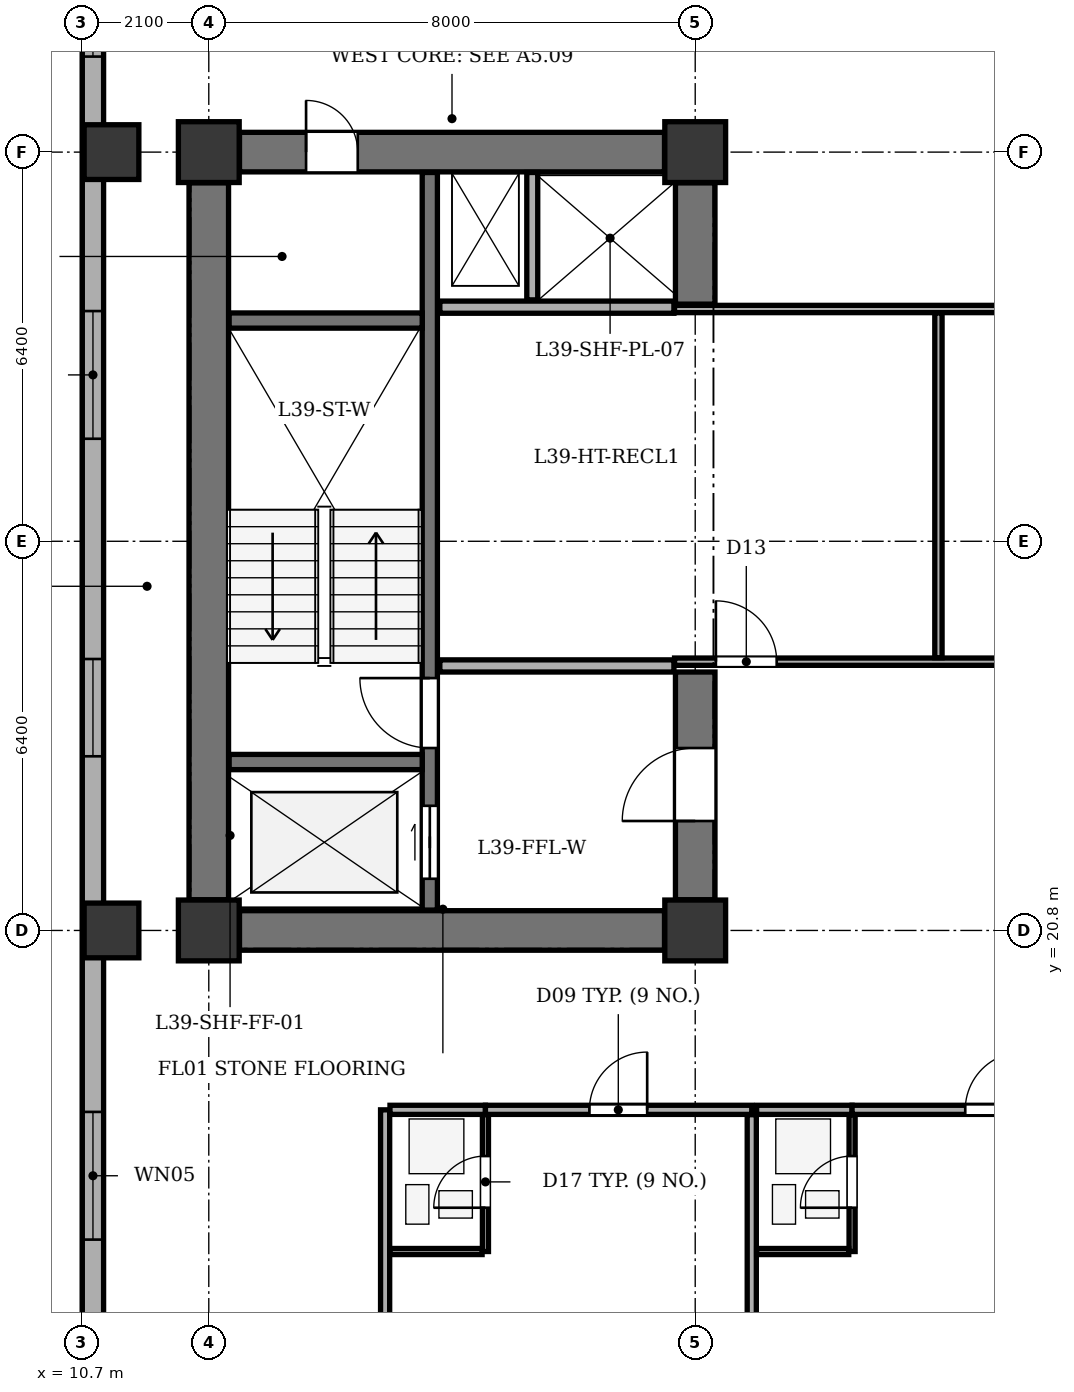
"""IFC4 building model, lengths in metres.
Left out: names, types, materials, properties, quantities, classifications, styles, units other than length and angle.
Written with IfcOpenShell. Run it as: python <this file> out.ifc"""

import sys

from ifc_helpers import new_model, si_unit, direction, frame, frame_2d, origin, origin_2d, place, context, subcontext, project, spatial, rectangle, extrude, element, fill, save


model = new_model("IFC4")
c1 = context("Model", 3, precision=1e-05, world=origin(), true_north=direction((0.0, 1.0)))
c2 = subcontext(c1, "Body", "Model", "MODEL_VIEW")
j1 = project(units=[si_unit("LENGTHUNIT", "METRE"), si_unit("PLANEANGLEUNIT", "RADIAN")], contexts=[c1])
p1 = place(None, origin())
s1 = spatial("IfcSite", under=j1, at=p1, CompositionType="ELEMENT")
p2 = place(p1, origin())
s2 = spatial("IfcBuilding", under=s1, at=p2, CompositionType="ELEMENT")
p3 = place(p2, frame((0.0, 0.0, 155.3)))
s3 = spatial("IfcBuildingStorey", under=s2, at=p3, CompositionType="ELEMENT", Elevation=155.3)
for number, where, z_axis, x_axis in (
    (1, (12.8, 20.8, 0.0), (0.0, 0.0, 1.0), (1.0, 0.0, 0.0)),
    (2, (20.8, 20.8, 0.0), (0.0, 0.0, 1.0), (1.0, 0.0, 0.0)),
    (3, (12.8, 33.6, 0.0), (0.0, 0.0, 1.0), (1.0, 0.0, 0.0)),
    (4, (20.8, 33.6, 0.0), (0.0, 0.0, 1.0), (1.0, 0.0, 0.0)),
):
    element("IfcColumn", number, at=place(p3, frame(where, z_axis=z_axis, x_axis=x_axis)), inside=s3, PredefinedType="COLUMN", context=c2, shape_type="SweptSolid", body=[
        extrude(rectangle(XDim=1.0, YDim=1.0, at=origin_2d()), origin(), (0.0, 0.0, 1.0), 3.5),
    ])
for number, where, z_axis, x_axis in (
    (5, (11.2, 20.8, 0.0), (0.0, 0.0, 1.0), (1.0, 0.0, 0.0)),
    (6, (11.2, 33.6, 0.0), (0.0, 0.0, 1.0), (1.0, 0.0, 0.0)),
):
    element("IfcColumn", number, at=place(p3, frame(where, z_axis=z_axis, x_axis=x_axis)), inside=s3, PredefinedType="COLUMN", context=c2, shape_type="SweptSolid", body=[
        extrude(rectangle(XDim=0.9, YDim=0.9, at=origin_2d()), origin(), (0.0, 0.0, 1.0), 3.5),
    ])
p4 = place(p3, frame((10.895, 6.5, 0.0), z_axis=(0.0, 0.0, 1.0), x_axis=(0.0, 1.0, 0.0)))
e7 = element("IfcWall", 7, at=p4, inside=s3, PredefinedType="STANDARD", context=c2, shape_type="SweptSolid", body=[
    extrude(rectangle(XDim=35.0, YDim=0.35, at=frame_2d((17.5, 0.0))), origin(), (0.0, 0.0, 1.0), 2.785),
])
p5 = place(p4, frame((3.31, 0.0, 0.75)))
e8 = element("IfcOpeningElement", 8, at=p5, cuts=e7, PredefinedType="OPENING", context=c2, shape_type="SweptSolid", body=[
    extrude(rectangle(XDim=1.6, YDim=1.75, at=frame_2d((0.8, 0.875))), frame((0.0, 0.185, 0.0), z_axis=(0.0, -1.0, 0.0), x_axis=(1.0, 0.0, 0.0)), (0.0, 0.0, 1.0), 0.37),
])
p6 = place(p4, frame((9.216, 0.0, 0.75)))
e9 = element("IfcOpeningElement", 9, at=p6, cuts=e7, PredefinedType="OPENING", context=c2, shape_type="SweptSolid", body=[
    extrude(rectangle(XDim=2.1, YDim=1.75, at=frame_2d((1.05, 0.875))), frame((0.0, 0.185, 0.0), z_axis=(0.0, -1.0, 0.0), x_axis=(1.0, 0.0, 0.0)), (0.0, 0.0, 1.0), 0.37),
])
p7 = place(p4, frame((17.164, 0.0, 0.75)))
e10 = element("IfcOpeningElement", 10, at=p7, cuts=e7, PredefinedType="OPENING", context=c2, shape_type="SweptSolid", body=[
    extrude(rectangle(XDim=1.6, YDim=1.75, at=frame_2d((0.8, 0.875))), frame((0.0, 0.185, 0.0), z_axis=(0.0, -1.0, 0.0), x_axis=(1.0, 0.0, 0.0)), (0.0, 0.0, 1.0), 0.37),
])
p8 = place(p4, frame((22.386, 0.0, 0.75)))
e11 = element("IfcOpeningElement", 11, at=p8, cuts=e7, PredefinedType="OPENING", context=c2, shape_type="SweptSolid", body=[
    extrude(rectangle(XDim=2.1, YDim=1.75, at=frame_2d((1.05, 0.875))), frame((0.0, 0.185, 0.0), z_axis=(0.0, -1.0, 0.0), x_axis=(1.0, 0.0, 0.0)), (0.0, 0.0, 1.0), 0.37),
])
p9 = place(p4, frame((28.671, 0.0, 0.75)))
e12 = element("IfcOpeningElement", 12, at=p9, cuts=e7, PredefinedType="OPENING", context=c2, shape_type="SweptSolid", body=[
    extrude(rectangle(XDim=1.6, YDim=1.75, at=frame_2d((0.8, 0.875))), frame((0.0, 0.185, 0.0), z_axis=(0.0, -1.0, 0.0), x_axis=(1.0, 0.0, 0.0)), (0.0, 0.0, 1.0), 0.37),
])
p10 = place(p4, frame((31.755, 0.0, 0.75)))
e13 = element("IfcOpeningElement", 13, at=p10, cuts=e7, PredefinedType="OPENING", context=c2, shape_type="SweptSolid", body=[
    extrude(rectangle(XDim=1.6, YDim=1.75, at=frame_2d((0.8, 0.875))), frame((0.0, 0.185, 0.0), z_axis=(0.0, -1.0, 0.0), x_axis=(1.0, 0.0, 0.0)), (0.0, 0.0, 1.0), 0.37),
])
p11 = place(p3, frame((12.8, 21.305, 0.0), z_axis=(0.0, 0.0, 1.0), x_axis=(0.0, 1.0, 0.0)))
e14 = element("IfcWall", 14, at=p11, inside=s3, PredefinedType="SHEAR", context=c2, shape_type="SweptSolid", body=[
    extrude(rectangle(XDim=11.79, YDim=0.65, at=frame_2d((5.895, 0.0))), origin(), (0.0, 0.0, 1.0), 3.2),
])
p12 = place(p3, frame((13.305, 20.8, 0.0), z_axis=(0.0, 0.0, 1.0), x_axis=(1.0, 0.0, 0.0)))
e15 = element("IfcWall", 15, at=p12, inside=s3, PredefinedType="SHEAR", context=c2, shape_type="SweptSolid", body=[
    extrude(rectangle(XDim=6.99, YDim=0.65, at=frame_2d((3.495, 0.0))), origin(), (0.0, 0.0, 1.0), 3.2),
])
p13 = place(p3, frame((13.305, 33.6, 0.0), z_axis=(0.0, 0.0, 1.0), x_axis=(1.0, 0.0, 0.0)))
e16 = element("IfcWall", 16, at=p13, inside=s3, PredefinedType="SHEAR", context=c2, shape_type="SweptSolid", body=[
    extrude(rectangle(XDim=6.99, YDim=0.65, at=frame_2d((3.495, 0.0))), origin(), (0.0, 0.0, 1.0), 3.2),
])
p14 = place(p13, frame((1.095, 0.0, 0.0)))
e17 = element("IfcOpeningElement", 17, at=p14, cuts=e16, PredefinedType="OPENING", context=c2, shape_type="SweptSolid", body=[
    extrude(rectangle(XDim=0.85, YDim=2.02, at=frame_2d((0.425, 1.01))), frame((0.0, 0.335, 0.0), z_axis=(0.0, -1.0, 0.0), x_axis=(1.0, 0.0, 0.0)), (0.0, 0.0, 1.0), 0.67),
])
p15 = place(p3, frame((20.8, 21.305, 0.0), z_axis=(0.0, 0.0, 1.0), x_axis=(0.0, 1.0, 0.0)))
e18 = element("IfcWall", 18, at=p15, inside=s3, PredefinedType="SHEAR", context=c2, shape_type="SweptSolid", body=[
    extrude(rectangle(XDim=3.745, YDim=0.65, at=frame_2d((1.873, 0.0))), origin(), (0.0, 0.0, 1.0), 3.2),
])
p16 = place(p15, frame((1.295, 0.0, 0.0)))
e19 = element("IfcOpeningElement", 19, at=p16, cuts=e18, PredefinedType="OPENING", context=c2, shape_type="SweptSolid", body=[
    extrude(rectangle(XDim=1.2, YDim=2.15, at=frame_2d((0.6, 1.075))), frame((0.0, 0.335, 0.0), z_axis=(0.0, -1.0, 0.0), x_axis=(1.0, 0.0, 0.0)), (0.0, 0.0, 1.0), 0.67),
])
p17 = place(p3, frame((20.8, 31.1, 0.0), z_axis=(0.0, 0.0, 1.0), x_axis=(0.0, 1.0, 0.0)))
e20 = element("IfcWall", 20, at=p17, inside=s3, PredefinedType="SHEAR", context=c2, shape_type="SweptSolid", body=[
    extrude(rectangle(XDim=1.995, YDim=0.65, at=frame_2d((0.998, 0.0))), origin(), (0.0, 0.0, 1.0), 3.2),
])
p18 = place(p3, frame((16.435, 21.135, 0.0), z_axis=(0.0, 0.0, 1.0), x_axis=(0.0, 1.0, 0.0)))
e21 = element("IfcWall", 21, at=p18, inside=s3, PredefinedType="SHEAR", context=c2, shape_type="SweptSolid", body=[
    extrude(rectangle(XDim=12.13, YDim=0.25, at=frame_2d((6.065, 0.0))), origin(), (0.0, 0.0, 1.0), 3.2),
])
p19 = place(p18, frame((0.515, 0.0, 0.0)))
e22 = element("IfcOpeningElement", 22, at=p19, cuts=e21, PredefinedType="OPENING", context=c2, shape_type="SweptSolid", body=[
    extrude(rectangle(XDim=1.2, YDim=2.15, at=frame_2d((0.6, 1.075))), frame((0.0, 0.135, 0.0), z_axis=(0.0, -1.0, 0.0), x_axis=(1.0, 0.0, 0.0)), (0.0, 0.0, 1.0), 0.27),
])
p20 = place(p18, frame((2.665, 0.0, 0.0)))
e23 = element("IfcOpeningElement", 23, at=p20, cuts=e21, PredefinedType="OPENING", context=c2, shape_type="SweptSolid", body=[
    extrude(rectangle(XDim=1.15, YDim=2.15, at=frame_2d((0.575, 1.075))), frame((0.0, 0.135, 0.0), z_axis=(0.0, -1.0, 0.0), x_axis=(1.0, 0.0, 0.0)), (0.0, 0.0, 1.0), 0.27),
])
for number, where, z_axis, x_axis in (
    (24, (13.135, 23.57, 0.0), (0.0, 0.0, 1.0), (1.0, 0.0, 0.0)),
    (25, (13.135, 30.83, 0.0), (0.0, 0.0, 1.0), (1.0, 0.0, 0.0)),
):
    element("IfcWall", number, at=place(p3, frame(where, z_axis=z_axis, x_axis=x_axis)), inside=s3, PredefinedType="SHEAR", context=c2, shape_type="SweptSolid", body=[
        extrude(rectangle(XDim=3.175, YDim=0.25, at=frame_2d((1.587, 0.0))), origin(), (0.0, 0.0, 1.0), 3.2),
    ])
for number, where, z_axis, x_axis in (
    (26, (16.6, 25.15, 0.0), (0.0, 0.0, 1.0), (1.0, 0.0, 0.0)),
    (27, (16.6, 31.05, 0.0), (0.0, 0.0, 1.0), (1.0, 0.0, 0.0)),
):
    element("IfcWall", number, at=place(p3, frame(where, z_axis=z_axis, x_axis=x_axis)), inside=s3, PredefinedType="SOLIDWALL", context=c2, shape_type="SweptSolid", body=[
        extrude(rectangle(XDim=3.85, YDim=0.2, at=frame_2d((1.925, 0.0))), origin(), (0.0, 0.0, 1.0), 3.2),
    ])
p21 = place(p3, frame((18.12, 31.17, 0.0), z_axis=(0.0, 0.0, 1.0), x_axis=(0.0, 1.0, 0.0)))
e28 = element("IfcWall", 28, at=p21, inside=s3, PredefinedType="PARTITIONING", context=c2, shape_type="SweptSolid", body=[
    extrude(rectangle(XDim=2.095, YDim=0.18, at=frame_2d((1.047, 0.0))), origin(), (0.0, 0.0, 1.0), 3.2),
])
p22 = place(p3, frame((20.46, 25.22, 0.0), z_axis=(0.0, 0.0, 1.0), x_axis=(1.0, 0.0, 0.0)))
e29 = element("IfcWall", 29, at=p22, inside=s3, PredefinedType="PARTITIONING", context=c2, shape_type="SweptSolid", body=[
    extrude(rectangle(XDim=11.94, YDim=0.12, at=frame_2d((5.97, 0.0))), origin(), (0.0, 0.0, 1.0), 3.2),
])
p23 = place(p22, frame((0.68, 0.0, 0.0)))
e30 = element("IfcOpeningElement", 30, at=p23, cuts=e29, PredefinedType="OPENING", context=c2, shape_type="SweptSolid", body=[
    extrude(rectangle(XDim=1.0, YDim=2.1, at=frame_2d((0.5, 1.05))), frame((0.0, 0.07, 0.0), z_axis=(0.0, -1.0, 0.0), x_axis=(1.0, 0.0, 0.0)), (0.0, 0.0, 1.0), 0.14),
])
p24 = place(p3, frame((20.46, 31.02, 0.0), z_axis=(0.0, 0.0, 1.0), x_axis=(1.0, 0.0, 0.0)))
e31 = element("IfcWall", 31, at=p24, inside=s3, PredefinedType="PARTITIONING", context=c2, shape_type="SweptSolid", body=[
    extrude(rectangle(XDim=11.94, YDim=0.12, at=frame_2d((5.97, 0.0))), origin(), (0.0, 0.0, 1.0), 3.2),
])
p25 = place(p3, frame((24.8, 25.285, 0.0), z_axis=(0.0, 0.0, 1.0), x_axis=(0.0, 1.0, 0.0)))
e32 = element("IfcWall", 32, at=p25, inside=s3, PredefinedType="PARTITIONING", context=c2, shape_type="SweptSolid", body=[
    extrude(rectangle(XDim=5.67, YDim=0.12, at=frame_2d((2.835, 0.0))), origin(), (0.0, 0.0, 1.0), 3.2),
])
p26 = place(p3, frame((15.7, 1.875, 0.0), z_axis=(0.0, 0.0, 1.0), x_axis=(0.0, 1.0, 0.0)))
e33 = element("IfcWall", 33, at=p26, inside=s3, PredefinedType="PARTITIONING", context=c2, shape_type="SweptSolid", body=[
    extrude(rectangle(XDim=15.975, YDim=0.15, at=frame_2d((7.988, 0.0))), origin(), (0.0, 0.0, 1.0), 3.2),
])
p27 = place(p3, frame((15.78, 17.85, 0.0), z_axis=(0.0, 0.0, 1.0), x_axis=(1.0, 0.0, 0.0)))
e34 = element("IfcWall", 34, at=p27, inside=s3, PredefinedType="PARTITIONING", context=c2, shape_type="SweptSolid", body=[
    extrude(rectangle(XDim=1.57, YDim=0.15, at=frame_2d((0.785, 0.0))), origin(), (0.0, 0.0, 1.0), 3.2),
])
p28 = place(p3, frame((17.35, 17.85, 0.0), z_axis=(0.0, 0.0, 1.0), x_axis=(1.0, 0.0, 0.0)))
e35 = element("IfcWall", 35, at=p28, inside=s3, PredefinedType="PARTITIONING", context=c2, shape_type="SweptSolid", body=[
    extrude(rectangle(XDim=4.38, YDim=0.15, at=frame_2d((2.19, 0.0))), origin(), (0.0, 0.0, 1.0), 3.2),
])
p29 = place(p28, frame((1.71, 0.0, 0.0)))
e36 = element("IfcOpeningElement", 36, at=p29, cuts=e35, PredefinedType="OPENING", context=c2, shape_type="SweptSolid", body=[
    extrude(rectangle(XDim=0.95, YDim=2.1, at=frame_2d((0.475, 1.05))), frame((0.0, 0.085, 0.0), z_axis=(0.0, -1.0, 0.0), x_axis=(1.0, 0.0, 0.0)), (0.0, 0.0, 1.0), 0.17),
])
p30 = place(p3, frame((17.35, 15.52, 0.0), z_axis=(0.0, 0.0, 1.0), x_axis=(0.0, 1.0, 0.0)))
e37 = element("IfcWall", 37, at=p30, inside=s3, PredefinedType="PARTITIONING", context=c2, shape_type="SweptSolid", body=[
    extrude(rectangle(XDim=2.25, YDim=0.1, at=frame_2d((1.125, 0.0))), origin(), (0.0, 0.0, 1.0), 3.2),
])
p31 = place(p30, frame((0.72, 0.0, 0.0)))
e38 = element("IfcOpeningElement", 38, at=p31, cuts=e37, PredefinedType="OPENING", context=c2, shape_type="SweptSolid", body=[
    extrude(rectangle(XDim=0.85, YDim=2.05, at=frame_2d((0.425, 1.025))), frame((0.0, 0.06, 0.0), z_axis=(0.0, -1.0, 0.0), x_axis=(1.0, 0.0, 0.0)), (0.0, 0.0, 1.0), 0.12),
])
p32 = place(p3, frame((15.78, 15.52, 0.0), z_axis=(0.0, 0.0, 1.0), x_axis=(1.0, 0.0, 0.0)))
e39 = element("IfcWall", 39, at=p32, inside=s3, PredefinedType="PARTITIONING", context=c2, shape_type="SweptSolid", body=[
    extrude(rectangle(XDim=1.515, YDim=0.1, at=frame_2d((0.757, 0.0))), origin(), (0.0, 0.0, 1.0), 3.2),
])
p33 = place(p3, frame((21.73, 1.875, 0.0), z_axis=(0.0, 0.0, 1.0), x_axis=(0.0, 1.0, 0.0)))
e40 = element("IfcWall", 40, at=p33, inside=s3, PredefinedType="PARTITIONING", context=c2, shape_type="SweptSolid", body=[
    extrude(rectangle(XDim=15.895, YDim=0.15, at=frame_2d((7.948, 0.0))), origin(), (0.0, 0.0, 1.0), 3.2),
])
p34 = place(p3, frame((21.81, 17.85, 0.0), z_axis=(0.0, 0.0, 1.0), x_axis=(1.0, 0.0, 0.0)))
e41 = element("IfcWall", 41, at=p34, inside=s3, PredefinedType="PARTITIONING", context=c2, shape_type="SweptSolid", body=[
    extrude(rectangle(XDim=1.57, YDim=0.15, at=frame_2d((0.785, 0.0))), origin(), (0.0, 0.0, 1.0), 3.2),
])
p35 = place(p3, frame((23.38, 17.85, 0.0), z_axis=(0.0, 0.0, 1.0), x_axis=(1.0, 0.0, 0.0)))
e42 = element("IfcWall", 42, at=p35, inside=s3, PredefinedType="PARTITIONING", context=c2, shape_type="SweptSolid", body=[
    extrude(rectangle(XDim=4.681, YDim=0.15, at=frame_2d((2.341, 0.0))), origin(), (0.0, 0.0, 1.0), 3.2),
])
p36 = place(p35, frame((1.861, 0.0, 0.0)))
e43 = element("IfcOpeningElement", 43, at=p36, cuts=e42, PredefinedType="OPENING", context=c2, shape_type="SweptSolid", body=[
    extrude(rectangle(XDim=0.95, YDim=2.1, at=frame_2d((0.475, 1.05))), frame((0.0, 0.085, 0.0), z_axis=(0.0, -1.0, 0.0), x_axis=(1.0, 0.0, 0.0)), (0.0, 0.0, 1.0), 0.17),
])
p37 = place(p3, frame((23.38, 15.52, 0.0), z_axis=(0.0, 0.0, 1.0), x_axis=(0.0, 1.0, 0.0)))
e44 = element("IfcWall", 44, at=p37, inside=s3, PredefinedType="PARTITIONING", context=c2, shape_type="SweptSolid", body=[
    extrude(rectangle(XDim=2.25, YDim=0.1, at=frame_2d((1.125, 0.0))), origin(), (0.0, 0.0, 1.0), 3.2),
])
p38 = place(p37, frame((0.72, 0.0, 0.0)))
e45 = element("IfcOpeningElement", 45, at=p38, cuts=e44, PredefinedType="OPENING", context=c2, shape_type="SweptSolid", body=[
    extrude(rectangle(XDim=0.85, YDim=2.05, at=frame_2d((0.425, 1.025))), frame((0.0, 0.06, 0.0), z_axis=(0.0, -1.0, 0.0), x_axis=(1.0, 0.0, 0.0)), (0.0, 0.0, 1.0), 0.12),
])
p39 = place(p3, frame((21.81, 15.52, 0.0), z_axis=(0.0, 0.0, 1.0), x_axis=(1.0, 0.0, 0.0)))
e46 = element("IfcWall", 46, at=p39, inside=s3, PredefinedType="PARTITIONING", context=c2, shape_type="SweptSolid", body=[
    extrude(rectangle(XDim=1.515, YDim=0.1, at=frame_2d((0.757, 0.0))), origin(), (0.0, 0.0, 1.0), 3.2),
])
p40 = place(p6, origin())
e47 = element("IfcWindow", 47, at=p40, inside=s3, PartitioningType="SINGLE_PANEL", PredefinedType="WINDOW", context=c2, shape_type="SweptSolid", body=[
    extrude(rectangle(XDim=2.1, YDim=1.75, at=frame_2d((1.05, 0.875))), frame((0.0, -0.01, 0.0), z_axis=(0.0, -1.0, 0.0), x_axis=(1.0, 0.0, 0.0)), (0.0, 0.0, 1.0), 0.06),
])
fill(e9, e47)
p41 = place(p7, origin())
e48 = element("IfcWindow", 48, at=p41, inside=s3, PartitioningType="SINGLE_PANEL", PredefinedType="WINDOW", context=c2, shape_type="SweptSolid", body=[
    extrude(rectangle(XDim=1.6, YDim=1.75, at=frame_2d((0.8, 0.875))), frame((0.0, -0.01, 0.0), z_axis=(0.0, -1.0, 0.0), x_axis=(1.0, 0.0, 0.0)), (0.0, 0.0, 1.0), 0.06),
])
fill(e10, e48)
p42 = place(p8, origin())
e49 = element("IfcWindow", 49, at=p42, inside=s3, PartitioningType="SINGLE_PANEL", PredefinedType="WINDOW", context=c2, shape_type="SweptSolid", body=[
    extrude(rectangle(XDim=2.1, YDim=1.75, at=frame_2d((1.05, 0.875))), frame((0.0, -0.01, 0.0), z_axis=(0.0, -1.0, 0.0), x_axis=(1.0, 0.0, 0.0)), (0.0, 0.0, 1.0), 0.06),
])
fill(e11, e49)
p43 = place(p9, origin())
e50 = element("IfcWindow", 50, at=p43, inside=s3, PartitioningType="SINGLE_PANEL", PredefinedType="WINDOW", context=c2, shape_type="SweptSolid", body=[
    extrude(rectangle(XDim=1.6, YDim=1.75, at=frame_2d((0.8, 0.875))), frame((0.0, -0.01, 0.0), z_axis=(0.0, -1.0, 0.0), x_axis=(1.0, 0.0, 0.0)), (0.0, 0.0, 1.0), 0.06),
])
fill(e12, e50)
p44 = place(p14, origin())
e51 = element("IfcDoor", 51, at=p44, inside=s3, OperationType="SINGLE_SWING_LEFT", PredefinedType="DOOR", context=c2, shape_type="SweptSolid", body=[
    extrude(rectangle(XDim=0.85, YDim=2.02, at=frame_2d((0.425, 1.01))), frame((0.0, 0.025, 0.0), z_axis=(0.0, -1.0, 0.0), x_axis=(1.0, 0.0, 0.0)), (0.0, 0.0, 1.0), 0.05),
])
fill(e17, e51)
p45 = place(p16, origin())
e52 = element("IfcDoor", 52, at=p45, inside=s3, OperationType="SINGLE_SWING_LEFT", PredefinedType="DOOR", context=c2, shape_type="SweptSolid", body=[
    extrude(rectangle(XDim=1.2, YDim=2.15, at=frame_2d((0.6, 1.075))), frame((0.0, 0.025, 0.0), z_axis=(0.0, -1.0, 0.0), x_axis=(1.0, 0.0, 0.0)), (0.0, 0.0, 1.0), 0.05),
])
fill(e19, e52)
p46 = place(p19, origin())
e53 = element("IfcDoor", 53, at=p46, inside=s3, OperationType="DOUBLE_DOOR_SLIDING", PredefinedType="DOOR", context=c2, shape_type="SweptSolid", body=[
    extrude(rectangle(XDim=1.2, YDim=2.15, at=frame_2d((0.6, 1.075))), frame((0.0, 0.025, 0.0), z_axis=(0.0, -1.0, 0.0), x_axis=(1.0, 0.0, 0.0)), (0.0, 0.0, 1.0), 0.05),
])
fill(e22, e53)
p47 = place(p20, origin())
e54 = element("IfcDoor", 54, at=p47, inside=s3, OperationType="SINGLE_SWING_RIGHT", PredefinedType="DOOR", context=c2, shape_type="SweptSolid", body=[
    extrude(rectangle(XDim=1.15, YDim=2.15, at=frame_2d((0.575, 1.075))), frame((0.0, 0.025, 0.0), z_axis=(0.0, -1.0, 0.0), x_axis=(1.0, 0.0, 0.0)), (0.0, 0.0, 1.0), 0.05),
])
fill(e23, e54)
p48 = place(p23, origin())
e55 = element("IfcDoor", 55, at=p48, inside=s3, OperationType="SINGLE_SWING_LEFT", PredefinedType="DOOR", context=c2, shape_type="SweptSolid", body=[
    extrude(rectangle(XDim=1.0, YDim=2.1, at=frame_2d((0.5, 1.05))), frame((0.0, 0.025, 0.0), z_axis=(0.0, -1.0, 0.0), x_axis=(1.0, 0.0, 0.0)), (0.0, 0.0, 1.0), 0.05),
])
fill(e30, e55)
p49 = place(p31, origin())
e56 = element("IfcDoor", 56, at=p49, inside=s3, OperationType="SINGLE_SWING_LEFT", PredefinedType="DOOR", context=c2, shape_type="SweptSolid", body=[
    extrude(rectangle(XDim=0.85, YDim=2.05, at=frame_2d((0.425, 1.025))), frame((0.0, 0.025, 0.0), z_axis=(0.0, -1.0, 0.0), x_axis=(1.0, 0.0, 0.0)), (0.0, 0.0, 1.0), 0.05),
])
fill(e38, e56)
p50 = place(p29, origin())
e57 = element("IfcDoor", 57, at=p50, inside=s3, OperationType="SINGLE_SWING_RIGHT", PredefinedType="DOOR", context=c2, shape_type="SweptSolid", body=[
    extrude(rectangle(XDim=0.95, YDim=2.1, at=frame_2d((0.475, 1.05))), frame((0.0, 0.025, 0.0), z_axis=(0.0, -1.0, 0.0), x_axis=(1.0, 0.0, 0.0)), (0.0, 0.0, 1.0), 0.05),
])
fill(e36, e57)
p51 = place(p38, origin())
e58 = element("IfcDoor", 58, at=p51, inside=s3, OperationType="SINGLE_SWING_LEFT", PredefinedType="DOOR", context=c2, shape_type="SweptSolid", body=[
    extrude(rectangle(XDim=0.85, YDim=2.05, at=frame_2d((0.425, 1.025))), frame((0.0, 0.025, 0.0), z_axis=(0.0, -1.0, 0.0), x_axis=(1.0, 0.0, 0.0)), (0.0, 0.0, 1.0), 0.05),
])
fill(e45, e58)
p52 = place(p36, origin())
e59 = element("IfcDoor", 59, at=p52, inside=s3, OperationType="SINGLE_SWING_RIGHT", PredefinedType="DOOR", context=c2, shape_type="SweptSolid", body=[
    extrude(rectangle(XDim=0.95, YDim=2.1, at=frame_2d((0.475, 1.05))), frame((0.0, 0.025, 0.0), z_axis=(0.0, -1.0, 0.0), x_axis=(1.0, 0.0, 0.0)), (0.0, 0.0, 1.0), 0.05),
])
fill(e43, e59)
save(model, sys.argv[1])
